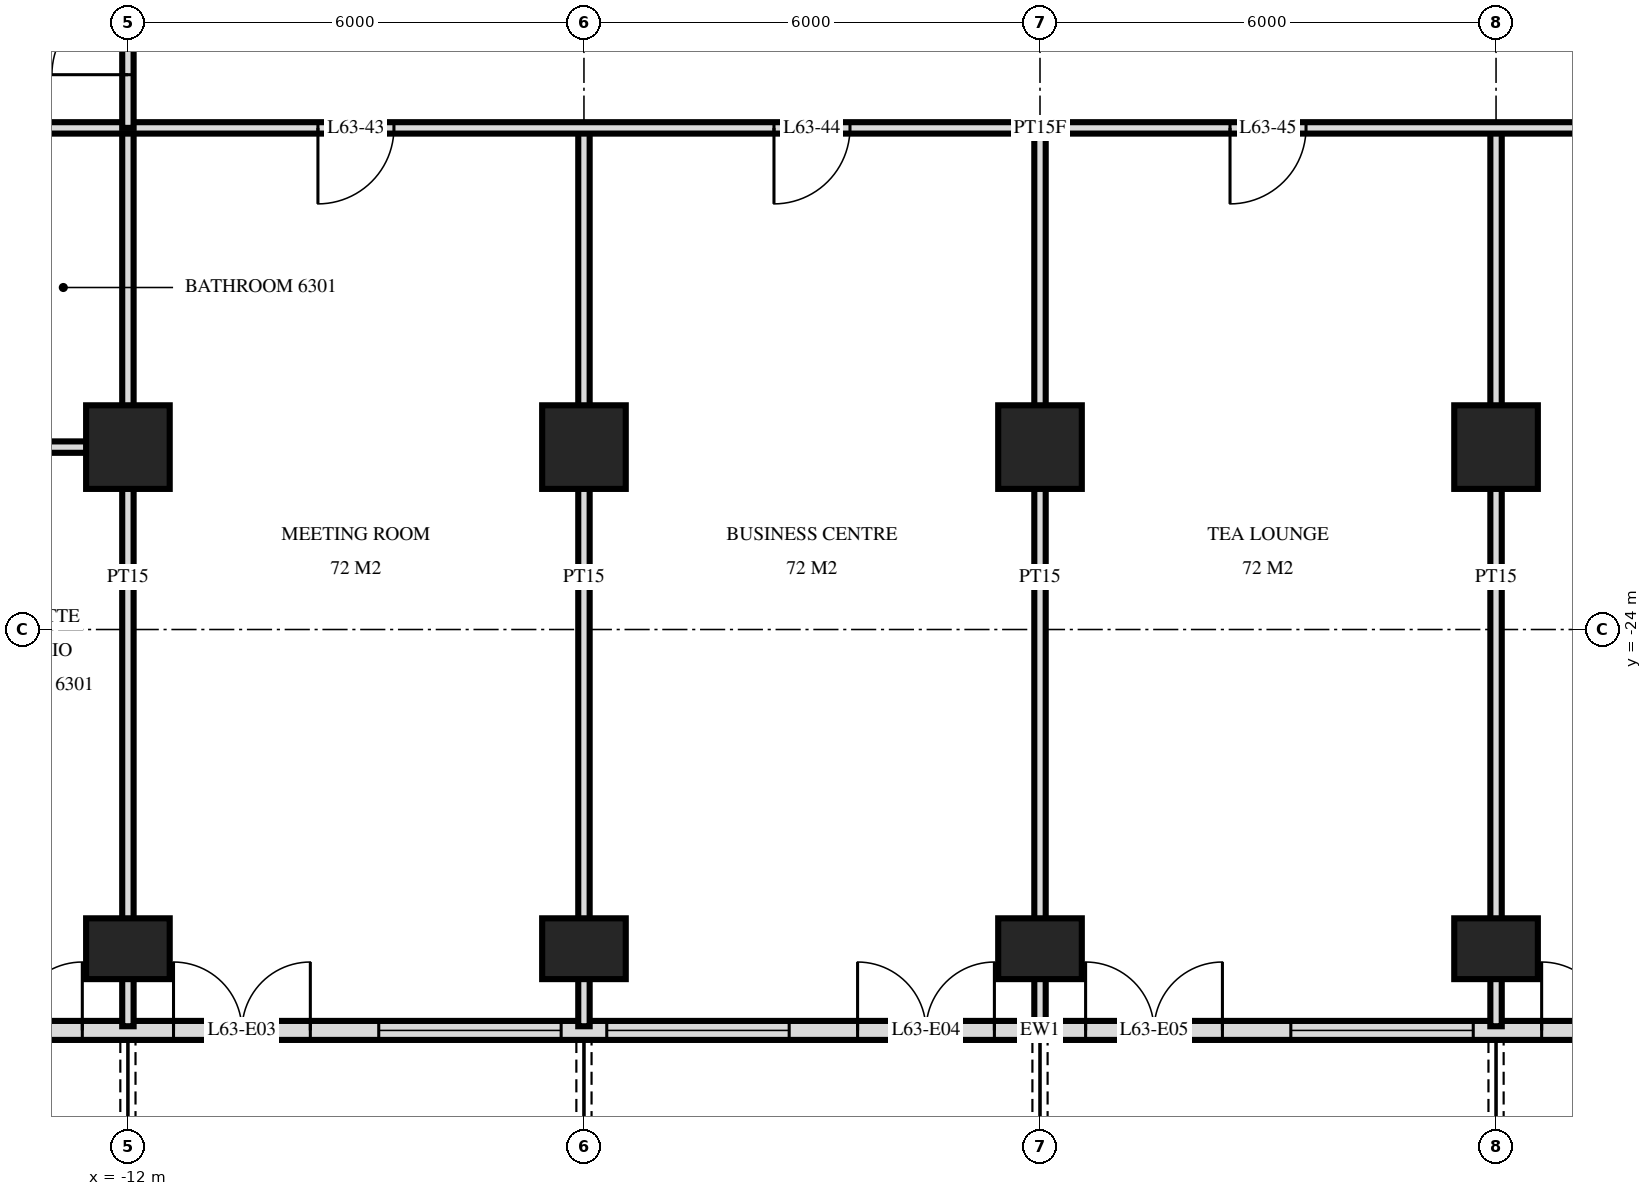
"""IFC4 building model, lengths in metres.
Left out: names, types, materials, properties, quantities, classifications, styles, units other than length and angle.
Written with IfcOpenShell. Run it as: python <this file> out.ifc"""

import sys

from ifc_helpers import new_model, si_unit, direction, frame, frame_2d, origin, origin_2d, place, context, subcontext, project, spatial, rectangle, extrude, element, fill, save


model = new_model("IFC4")
c1 = context("Model", 3, precision=1e-05, world=origin(), true_north=direction((0.0, 1.0)))
c2 = subcontext(c1, "Body", "Model", "MODEL_VIEW")
j1 = project(units=[si_unit("LENGTHUNIT", "METRE"), si_unit("PLANEANGLEUNIT", "RADIAN")], contexts=[c1])
p1 = place(None, origin())
s1 = spatial("IfcSite", under=j1, at=p1, CompositionType="ELEMENT")
p2 = place(p1, origin())
s2 = spatial("IfcBuilding", under=s1, at=p2, CompositionType="ELEMENT")
p3 = place(p2, frame((0.0, 0.0, 239.6)))
s3 = spatial("IfcBuildingStorey", under=s2, at=p3, CompositionType="ELEMENT", Elevation=239.6)
p4 = place(p3, frame((-12.0, -28.2, 0.0), z_axis=(0.0, 0.0, 1.0), x_axis=(1.0, 0.0, 0.0)))
e1 = element("IfcColumn", 1, at=p4, inside=s3, PredefinedType="COLUMN", context=c2, shape_type="SweptSolid", body=[
    extrude(rectangle(XDim=1.1, YDim=0.8, at=origin_2d()), origin(), (0.0, 0.0, 1.0), 3.5),
])
p5 = place(p3, frame((-12.0, -21.6, 0.0), z_axis=(0.0, 0.0, 1.0), x_axis=(1.0, 0.0, 0.0)))
e2 = element("IfcColumn", 2, at=p5, inside=s3, PredefinedType="COLUMN", context=c2, shape_type="SweptSolid", body=[
    extrude(rectangle(XDim=1.1, YDim=1.1, at=origin_2d()), origin(), (0.0, 0.0, 1.0), 3.5),
])
p6 = place(p3, frame((-6.0, -28.2, 0.0), z_axis=(0.0, 0.0, 1.0), x_axis=(1.0, 0.0, 0.0)))
e3 = element("IfcColumn", 3, at=p6, inside=s3, PredefinedType="COLUMN", context=c2, shape_type="SweptSolid", body=[
    extrude(rectangle(XDim=1.1, YDim=0.8, at=origin_2d()), origin(), (0.0, 0.0, 1.0), 3.5),
])
p7 = place(p3, frame((-6.0, -21.6, 0.0), z_axis=(0.0, 0.0, 1.0), x_axis=(1.0, 0.0, 0.0)))
e4 = element("IfcColumn", 4, at=p7, inside=s3, PredefinedType="COLUMN", context=c2, shape_type="SweptSolid", body=[
    extrude(rectangle(XDim=1.1, YDim=1.1, at=origin_2d()), origin(), (0.0, 0.0, 1.0), 3.5),
])
p8 = place(p3, frame((0.0, -28.2, 0.0), z_axis=(0.0, 0.0, 1.0), x_axis=(1.0, 0.0, 0.0)))
e5 = element("IfcColumn", 5, at=p8, inside=s3, PredefinedType="COLUMN", context=c2, shape_type="SweptSolid", body=[
    extrude(rectangle(XDim=1.1, YDim=0.8, at=origin_2d()), origin(), (0.0, 0.0, 1.0), 3.5),
])
p9 = place(p3, frame((0.0, -21.6, 0.0), z_axis=(0.0, 0.0, 1.0), x_axis=(1.0, 0.0, 0.0)))
e6 = element("IfcColumn", 6, at=p9, inside=s3, PredefinedType="COLUMN", context=c2, shape_type="SweptSolid", body=[
    extrude(rectangle(XDim=1.1, YDim=1.1, at=origin_2d()), origin(), (0.0, 0.0, 1.0), 3.5),
])
p10 = place(p3, frame((6.0, -28.2, 0.0), z_axis=(0.0, 0.0, 1.0), x_axis=(1.0, 0.0, 0.0)))
e7 = element("IfcColumn", 7, at=p10, inside=s3, PredefinedType="COLUMN", context=c2, shape_type="SweptSolid", body=[
    extrude(rectangle(XDim=1.1, YDim=0.8, at=origin_2d()), origin(), (0.0, 0.0, 1.0), 3.5),
])
p11 = place(p3, frame((6.0, -21.6, 0.0), z_axis=(0.0, 0.0, 1.0), x_axis=(1.0, 0.0, 0.0)))
e8 = element("IfcColumn", 8, at=p11, inside=s3, PredefinedType="COLUMN", context=c2, shape_type="SweptSolid", body=[
    extrude(rectangle(XDim=1.1, YDim=1.1, at=origin_2d()), origin(), (0.0, 0.0, 1.0), 3.5),
])
p12 = place(p3, frame((-22.475, -29.275, 0.0), z_axis=(0.0, 0.0, 1.0), x_axis=(1.0, 0.0, 0.0)))
e9 = element("IfcWall", 9, at=p12, inside=s3, PredefinedType="SOLIDWALL", context=c2, shape_type="SweptSolid", body=[
    extrude(rectangle(XDim=44.951, YDim=0.25, at=frame_2d((22.475, 0.0))), origin(), (0.0, 0.0, 1.0), 3.22),
])
p13 = place(p12, frame((0.575, 0.0, 0.0)))
e10 = element("IfcOpeningElement", 10, at=p13, cuts=e9, PredefinedType="OPENING", context=c2, shape_type="SweptSolid", body=[
    extrude(rectangle(XDim=1.8, YDim=2.4, at=frame_2d((0.9, 1.2))), frame((0.0, 0.135, 0.0), z_axis=(0.0, -1.0, 0.0), x_axis=(1.0, 0.0, 0.0)), (0.0, 0.0, 1.0), 0.27),
])
p14 = place(p12, frame((4.775, 0.0, 0.9)))
e11 = element("IfcOpeningElement", 11, at=p14, cuts=e9, PredefinedType="OPENING", context=c2, shape_type="SweptSolid", body=[
    extrude(rectangle(XDim=2.4, YDim=1.5, at=frame_2d((1.2, 0.75))), frame((0.0, 0.135, 0.0), z_axis=(0.0, -1.0, 0.0), x_axis=(1.0, 0.0, 0.0)), (0.0, 0.0, 1.0), 0.27),
])
p15 = place(p12, frame((8.075, 0.0, 0.0)))
e12 = element("IfcOpeningElement", 12, at=p15, cuts=e9, PredefinedType="OPENING", context=c2, shape_type="SweptSolid", body=[
    extrude(rectangle(XDim=1.8, YDim=2.4, at=frame_2d((0.9, 1.2))), frame((0.0, 0.135, 0.0), z_axis=(0.0, -1.0, 0.0), x_axis=(1.0, 0.0, 0.0)), (0.0, 0.0, 1.0), 0.27),
])
p16 = place(p12, frame((11.075, 0.0, 0.0)))
e13 = element("IfcOpeningElement", 13, at=p16, cuts=e9, PredefinedType="OPENING", context=c2, shape_type="SweptSolid", body=[
    extrude(rectangle(XDim=1.8, YDim=2.4, at=frame_2d((0.9, 1.2))), frame((0.0, 0.135, 0.0), z_axis=(0.0, -1.0, 0.0), x_axis=(1.0, 0.0, 0.0)), (0.0, 0.0, 1.0), 0.27),
])
p17 = place(p12, frame((13.775, 0.0, 0.9)))
e14 = element("IfcOpeningElement", 14, at=p17, cuts=e9, PredefinedType="OPENING", context=c2, shape_type="SweptSolid", body=[
    extrude(rectangle(XDim=2.4, YDim=1.5, at=frame_2d((1.2, 0.75))), frame((0.0, 0.135, 0.0), z_axis=(0.0, -1.0, 0.0), x_axis=(1.0, 0.0, 0.0)), (0.0, 0.0, 1.0), 0.27),
])
p18 = place(p12, frame((16.775, 0.0, 0.9)))
e15 = element("IfcOpeningElement", 15, at=p18, cuts=e9, PredefinedType="OPENING", context=c2, shape_type="SweptSolid", body=[
    extrude(rectangle(XDim=2.4, YDim=1.5, at=frame_2d((1.2, 0.75))), frame((0.0, 0.135, 0.0), z_axis=(0.0, -1.0, 0.0), x_axis=(1.0, 0.0, 0.0)), (0.0, 0.0, 1.0), 0.27),
])
p19 = place(p12, frame((20.075, 0.0, 0.0)))
e16 = element("IfcOpeningElement", 16, at=p19, cuts=e9, PredefinedType="OPENING", context=c2, shape_type="SweptSolid", body=[
    extrude(rectangle(XDim=1.8, YDim=2.4, at=frame_2d((0.9, 1.2))), frame((0.0, 0.135, 0.0), z_axis=(0.0, -1.0, 0.0), x_axis=(1.0, 0.0, 0.0)), (0.0, 0.0, 1.0), 0.27),
])
p20 = place(p12, frame((23.075, 0.0, 0.0)))
e17 = element("IfcOpeningElement", 17, at=p20, cuts=e9, PredefinedType="OPENING", context=c2, shape_type="SweptSolid", body=[
    extrude(rectangle(XDim=1.8, YDim=2.4, at=frame_2d((0.9, 1.2))), frame((0.0, 0.135, 0.0), z_axis=(0.0, -1.0, 0.0), x_axis=(1.0, 0.0, 0.0)), (0.0, 0.0, 1.0), 0.27),
])
p21 = place(p12, frame((25.775, 0.0, 0.9)))
e18 = element("IfcOpeningElement", 18, at=p21, cuts=e9, PredefinedType="OPENING", context=c2, shape_type="SweptSolid", body=[
    extrude(rectangle(XDim=2.4, YDim=1.5, at=frame_2d((1.2, 0.75))), frame((0.0, 0.135, 0.0), z_axis=(0.0, -1.0, 0.0), x_axis=(1.0, 0.0, 0.0)), (0.0, 0.0, 1.0), 0.27),
])
p22 = place(p12, frame((29.075, 0.0, 0.0)))
e19 = element("IfcOpeningElement", 19, at=p22, cuts=e9, PredefinedType="OPENING", context=c2, shape_type="SweptSolid", body=[
    extrude(rectangle(XDim=1.8, YDim=2.4, at=frame_2d((0.9, 1.2))), frame((0.0, 0.135, 0.0), z_axis=(0.0, -1.0, 0.0), x_axis=(1.0, 0.0, 0.0)), (0.0, 0.0, 1.0), 0.27),
])
p23 = place(p12, frame((31.775, 0.0, 0.9)))
e20 = element("IfcOpeningElement", 20, at=p23, cuts=e9, PredefinedType="OPENING", context=c2, shape_type="SweptSolid", body=[
    extrude(rectangle(XDim=2.4, YDim=1.5, at=frame_2d((1.2, 0.75))), frame((0.0, 0.135, 0.0), z_axis=(0.0, -1.0, 0.0), x_axis=(1.0, 0.0, 0.0)), (0.0, 0.0, 1.0), 0.27),
])
p24 = place(p12, frame((35.075, 0.0, 0.0)))
e21 = element("IfcOpeningElement", 21, at=p24, cuts=e9, PredefinedType="OPENING", context=c2, shape_type="SweptSolid", body=[
    extrude(rectangle(XDim=1.8, YDim=2.4, at=frame_2d((0.9, 1.2))), frame((0.0, 0.135, 0.0), z_axis=(0.0, -1.0, 0.0), x_axis=(1.0, 0.0, 0.0)), (0.0, 0.0, 1.0), 0.27),
])
p25 = place(p12, frame((41.075, 0.0, 0.0)))
e22 = element("IfcOpeningElement", 22, at=p25, cuts=e9, PredefinedType="OPENING", context=c2, shape_type="SweptSolid", body=[
    extrude(rectangle(XDim=1.8, YDim=2.4, at=frame_2d((0.9, 1.2))), frame((0.0, 0.135, 0.0), z_axis=(0.0, -1.0, 0.0), x_axis=(1.0, 0.0, 0.0)), (0.0, 0.0, 1.0), 0.27),
])
for number, where, z_axis, x_axis in (
    (23, (6.0, -29.22, 0.0), (0.0, 0.0, 1.0), (0.0, 1.0, 0.0)),
    (24, (0.0, -29.22, 0.0), (0.0, 0.0, 1.0), (0.0, 1.0, 0.0)),
    (25, (-6.0, -29.22, 0.0), (0.0, 0.0, 1.0), (0.0, 1.0, 0.0)),
):
    element("IfcWall", number, at=place(p3, frame(where, z_axis=z_axis, x_axis=x_axis)), inside=s3, PredefinedType="PARTITIONING", context=c2, shape_type="SweptSolid", body=[
        extrude(rectangle(XDim=11.82, YDim=0.15, at=frame_2d((5.91, 0.0))), origin(), (0.0, 0.0, 1.0), 3.22),
    ])
p26 = place(p3, frame((-12.0, -17.4, 0.0), z_axis=(0.0, 0.0, 1.0), x_axis=(0.0, 1.0, 0.0)))
e26 = element("IfcWall", 26, at=p26, inside=s3, PredefinedType="PARTITIONING", context=c2, shape_type="SweptSolid", body=[
    extrude(rectangle(XDim=2.35, YDim=0.15, at=frame_2d((1.175, 0.0))), origin(), (0.0, 0.0, 1.0), 3.22),
])
p27 = place(p26, frame((0.7, 0.0, 0.0)))
e27 = element("IfcOpeningElement", 27, at=p27, cuts=e26, PredefinedType="OPENING", context=c2, shape_type="SweptSolid", body=[
    extrude(rectangle(XDim=1.0, YDim=2.1, at=frame_2d((0.5, 1.05))), frame((0.0, 0.085, 0.0), z_axis=(0.0, -1.0, 0.0), x_axis=(1.0, 0.0, 0.0)), (0.0, 0.0, 1.0), 0.17),
])
p28 = place(p3, frame((-12.0, -29.22, 0.0), z_axis=(0.0, 0.0, 1.0), x_axis=(0.0, 1.0, 0.0)))
e28 = element("IfcWall", 28, at=p28, inside=s3, PredefinedType="PARTITIONING", context=c2, shape_type="SweptSolid", body=[
    extrude(rectangle(XDim=11.82, YDim=0.15, at=frame_2d((5.91, 0.0))), origin(), (0.0, 0.0, 1.0), 3.22),
])
p29 = place(p3, frame((-13.7, -21.6, 0.0), z_axis=(0.0, 0.0, 1.0), x_axis=(1.0, 0.0, 0.0)))
e29 = element("IfcWall", 29, at=p29, inside=s3, PredefinedType="PARTITIONING", context=c2, shape_type="SweptSolid", body=[
    extrude(rectangle(XDim=1.7, YDim=0.15, at=frame_2d((0.85, 0.0))), origin(), (0.0, 0.0, 1.0), 3.22),
])
p30 = place(p3, frame((-26.82, -17.4, 0.0), z_axis=(0.0, 0.0, 1.0), x_axis=(1.0, 0.0, 0.0)))
e30 = element("IfcWall", 30, at=p30, inside=s3, PredefinedType="PARTITIONING", context=c2, shape_type="SweptSolid", body=[
    extrude(rectangle(XDim=53.64, YDim=0.15, at=frame_2d((26.82, 0.0))), origin(), (0.0, 0.0, 1.0), 3.22),
])
p31 = place(p30, frame((11.97, 0.0, 0.0)))
e31 = element("IfcOpeningElement", 31, at=p31, cuts=e30, PredefinedType="OPENING", context=c2, shape_type="SweptSolid", body=[
    extrude(rectangle(XDim=1.0, YDim=2.1, at=frame_2d((0.5, 1.05))), frame((0.0, 0.085, 0.0), z_axis=(0.0, -1.0, 0.0), x_axis=(1.0, 0.0, 0.0)), (0.0, 0.0, 1.0), 0.17),
])
p32 = place(p30, frame((3.92, 0.0, 0.0)))
e32 = element("IfcOpeningElement", 32, at=p32, cuts=e30, PredefinedType="OPENING", context=c2, shape_type="SweptSolid", body=[
    extrude(rectangle(XDim=1.0, YDim=2.1, at=frame_2d((0.5, 1.05))), frame((0.0, 0.085, 0.0), z_axis=(0.0, -1.0, 0.0), x_axis=(1.0, 0.0, 0.0)), (0.0, 0.0, 1.0), 0.17),
])
p33 = place(p30, frame((5.72, 0.0, 0.0)))
e33 = element("IfcOpeningElement", 33, at=p33, cuts=e30, PredefinedType="OPENING", context=c2, shape_type="SweptSolid", body=[
    extrude(rectangle(XDim=1.0, YDim=2.1, at=frame_2d((0.5, 1.05))), frame((0.0, 0.085, 0.0), z_axis=(0.0, -1.0, 0.0), x_axis=(1.0, 0.0, 0.0)), (0.0, 0.0, 1.0), 0.17),
])
p34 = place(p30, frame((47.72, 0.0, 0.0)))
e34 = element("IfcOpeningElement", 34, at=p34, cuts=e30, PredefinedType="OPENING", context=c2, shape_type="SweptSolid", body=[
    extrude(rectangle(XDim=1.0, YDim=2.1, at=frame_2d((0.5, 1.05))), frame((0.0, 0.085, 0.0), z_axis=(0.0, -1.0, 0.0), x_axis=(1.0, 0.0, 0.0)), (0.0, 0.0, 1.0), 0.17),
])
p35 = place(p30, frame((51.02, 0.0, 0.0)))
e35 = element("IfcOpeningElement", 35, at=p35, cuts=e30, PredefinedType="OPENING", context=c2, shape_type="SweptSolid", body=[
    extrude(rectangle(XDim=1.0, YDim=2.1, at=frame_2d((0.5, 1.05))), frame((0.0, 0.085, 0.0), z_axis=(0.0, -1.0, 0.0), x_axis=(1.0, 0.0, 0.0)), (0.0, 0.0, 1.0), 0.17),
])
p36 = place(p30, frame((17.32, 0.0, 0.0)))
e36 = element("IfcOpeningElement", 36, at=p36, cuts=e30, PredefinedType="OPENING", context=c2, shape_type="SweptSolid", body=[
    extrude(rectangle(XDim=1.0, YDim=2.1, at=frame_2d((0.5, 1.05))), frame((0.0, 0.085, 0.0), z_axis=(0.0, -1.0, 0.0), x_axis=(1.0, 0.0, 0.0)), (0.0, 0.0, 1.0), 0.17),
])
p37 = place(p30, frame((23.32, 0.0, 0.0)))
e37 = element("IfcOpeningElement", 37, at=p37, cuts=e30, PredefinedType="OPENING", context=c2, shape_type="SweptSolid", body=[
    extrude(rectangle(XDim=1.0, YDim=2.1, at=frame_2d((0.5, 1.05))), frame((0.0, 0.085, 0.0), z_axis=(0.0, -1.0, 0.0), x_axis=(1.0, 0.0, 0.0)), (0.0, 0.0, 1.0), 0.17),
])
p38 = place(p30, frame((29.32, 0.0, 0.0)))
e38 = element("IfcOpeningElement", 38, at=p38, cuts=e30, PredefinedType="OPENING", context=c2, shape_type="SweptSolid", body=[
    extrude(rectangle(XDim=1.0, YDim=2.1, at=frame_2d((0.5, 1.05))), frame((0.0, 0.085, 0.0), z_axis=(0.0, -1.0, 0.0), x_axis=(1.0, 0.0, 0.0)), (0.0, 0.0, 1.0), 0.17),
])
p39 = place(p30, frame((35.32, 0.0, 0.0)))
e39 = element("IfcOpeningElement", 39, at=p39, cuts=e30, PredefinedType="OPENING", context=c2, shape_type="SweptSolid", body=[
    extrude(rectangle(XDim=1.0, YDim=2.1, at=frame_2d((0.5, 1.05))), frame((0.0, 0.085, 0.0), z_axis=(0.0, -1.0, 0.0), x_axis=(1.0, 0.0, 0.0)), (0.0, 0.0, 1.0), 0.17),
])
p40 = place(p15, origin())
e40 = element("IfcDoor", 40, at=p40, inside=s3, OperationType="DOUBLE_DOOR_SINGLE_SWING", PredefinedType="DOOR", context=c2, shape_type="SweptSolid", body=[
    extrude(rectangle(XDim=1.8, YDim=2.4, at=frame_2d((0.9, 1.2))), frame((0.0, 0.025, 0.0), z_axis=(0.0, -1.0, 0.0), x_axis=(1.0, 0.0, 0.0)), (0.0, 0.0, 1.0), 0.05),
])
fill(e12, e40)
p41 = place(p16, origin())
e41 = element("IfcDoor", 41, at=p41, inside=s3, OperationType="DOUBLE_DOOR_SINGLE_SWING", PredefinedType="DOOR", context=c2, shape_type="SweptSolid", body=[
    extrude(rectangle(XDim=1.8, YDim=2.4, at=frame_2d((0.9, 1.2))), frame((0.0, 0.025, 0.0), z_axis=(0.0, -1.0, 0.0), x_axis=(1.0, 0.0, 0.0)), (0.0, 0.0, 1.0), 0.05),
])
fill(e13, e41)
p42 = place(p17, origin())
e42 = element("IfcWindow", 42, at=p42, inside=s3, PartitioningType="SINGLE_PANEL", PredefinedType="WINDOW", context=c2, shape_type="SweptSolid", body=[
    extrude(rectangle(XDim=2.4, YDim=1.5, at=frame_2d((1.2, 0.75))), frame((0.0, 0.03, 0.0), z_axis=(0.0, -1.0, 0.0), x_axis=(1.0, 0.0, 0.0)), (0.0, 0.0, 1.0), 0.06),
])
fill(e14, e42)
p43 = place(p18, origin())
e43 = element("IfcWindow", 43, at=p43, inside=s3, PartitioningType="SINGLE_PANEL", PredefinedType="WINDOW", context=c2, shape_type="SweptSolid", body=[
    extrude(rectangle(XDim=2.4, YDim=1.5, at=frame_2d((1.2, 0.75))), frame((0.0, 0.03, 0.0), z_axis=(0.0, -1.0, 0.0), x_axis=(1.0, 0.0, 0.0)), (0.0, 0.0, 1.0), 0.06),
])
fill(e15, e43)
p44 = place(p19, origin())
e44 = element("IfcDoor", 44, at=p44, inside=s3, OperationType="DOUBLE_DOOR_SINGLE_SWING", PredefinedType="DOOR", context=c2, shape_type="SweptSolid", body=[
    extrude(rectangle(XDim=1.8, YDim=2.4, at=frame_2d((0.9, 1.2))), frame((0.0, 0.025, 0.0), z_axis=(0.0, -1.0, 0.0), x_axis=(1.0, 0.0, 0.0)), (0.0, 0.0, 1.0), 0.05),
])
fill(e16, e44)
p45 = place(p20, origin())
e45 = element("IfcDoor", 45, at=p45, inside=s3, OperationType="DOUBLE_DOOR_SINGLE_SWING", PredefinedType="DOOR", context=c2, shape_type="SweptSolid", body=[
    extrude(rectangle(XDim=1.8, YDim=2.4, at=frame_2d((0.9, 1.2))), frame((0.0, 0.025, 0.0), z_axis=(0.0, -1.0, 0.0), x_axis=(1.0, 0.0, 0.0)), (0.0, 0.0, 1.0), 0.05),
])
fill(e17, e45)
p46 = place(p21, origin())
e46 = element("IfcWindow", 46, at=p46, inside=s3, PartitioningType="SINGLE_PANEL", PredefinedType="WINDOW", context=c2, shape_type="SweptSolid", body=[
    extrude(rectangle(XDim=2.4, YDim=1.5, at=frame_2d((1.2, 0.75))), frame((0.0, 0.03, 0.0), z_axis=(0.0, -1.0, 0.0), x_axis=(1.0, 0.0, 0.0)), (0.0, 0.0, 1.0), 0.06),
])
fill(e18, e46)
p47 = place(p22, origin())
e47 = element("IfcDoor", 47, at=p47, inside=s3, OperationType="DOUBLE_DOOR_SINGLE_SWING", PredefinedType="DOOR", context=c2, shape_type="SweptSolid", body=[
    extrude(rectangle(XDim=1.8, YDim=2.4, at=frame_2d((0.9, 1.2))), frame((0.0, 0.025, 0.0), z_axis=(0.0, -1.0, 0.0), x_axis=(1.0, 0.0, 0.0)), (0.0, 0.0, 1.0), 0.05),
])
fill(e19, e47)
p48 = place(p27, origin())
e48 = element("IfcDoor", 48, at=p48, inside=s3, OperationType="SINGLE_SWING_RIGHT", PredefinedType="DOOR", context=c2, shape_type="SweptSolid", body=[
    extrude(rectangle(XDim=1.0, YDim=2.1, at=frame_2d((0.5, 1.05))), frame((0.0, 0.025, 0.0), z_axis=(0.0, -1.0, 0.0), x_axis=(1.0, 0.0, 0.0)), (0.0, 0.0, 1.0), 0.05),
])
fill(e27, e48)
p49 = place(p36, frame((0.5, 0.0, 0.0), z_axis=(0.0, 0.0, 1.0), x_axis=(-1.0, 0.0, 0.0)))
e49 = element("IfcDoor", 49, at=p49, inside=s3, OperationType="SINGLE_SWING_LEFT", PredefinedType="DOOR", context=c2, shape_type="SweptSolid", body=[
    extrude(rectangle(XDim=1.0, YDim=2.1, at=frame_2d((0.0, 1.05))), frame((0.0, -0.025, 0.0), z_axis=(0.0, 1.0, 0.0), x_axis=(-1.0, 0.0, 0.0)), (0.0, 0.0, 1.0), 0.05),
])
fill(e36, e49)
p50 = place(p37, frame((0.5, 0.0, 0.0), z_axis=(0.0, 0.0, 1.0), x_axis=(-1.0, 0.0, 0.0)))
e50 = element("IfcDoor", 50, at=p50, inside=s3, OperationType="SINGLE_SWING_LEFT", PredefinedType="DOOR", context=c2, shape_type="SweptSolid", body=[
    extrude(rectangle(XDim=1.0, YDim=2.1, at=frame_2d((0.0, 1.05))), frame((0.0, -0.025, 0.0), z_axis=(0.0, 1.0, 0.0), x_axis=(-1.0, 0.0, 0.0)), (0.0, 0.0, 1.0), 0.05),
])
fill(e37, e50)
p51 = place(p38, frame((0.5, 0.0, 0.0), z_axis=(0.0, 0.0, 1.0), x_axis=(-1.0, 0.0, 0.0)))
e51 = element("IfcDoor", 51, at=p51, inside=s3, OperationType="SINGLE_SWING_LEFT", PredefinedType="DOOR", context=c2, shape_type="SweptSolid", body=[
    extrude(rectangle(XDim=1.0, YDim=2.1, at=frame_2d((0.0, 1.05))), frame((0.0, -0.025, 0.0), z_axis=(0.0, 1.0, 0.0), x_axis=(-1.0, 0.0, 0.0)), (0.0, 0.0, 1.0), 0.05),
])
fill(e38, e51)
save(model, sys.argv[1])
